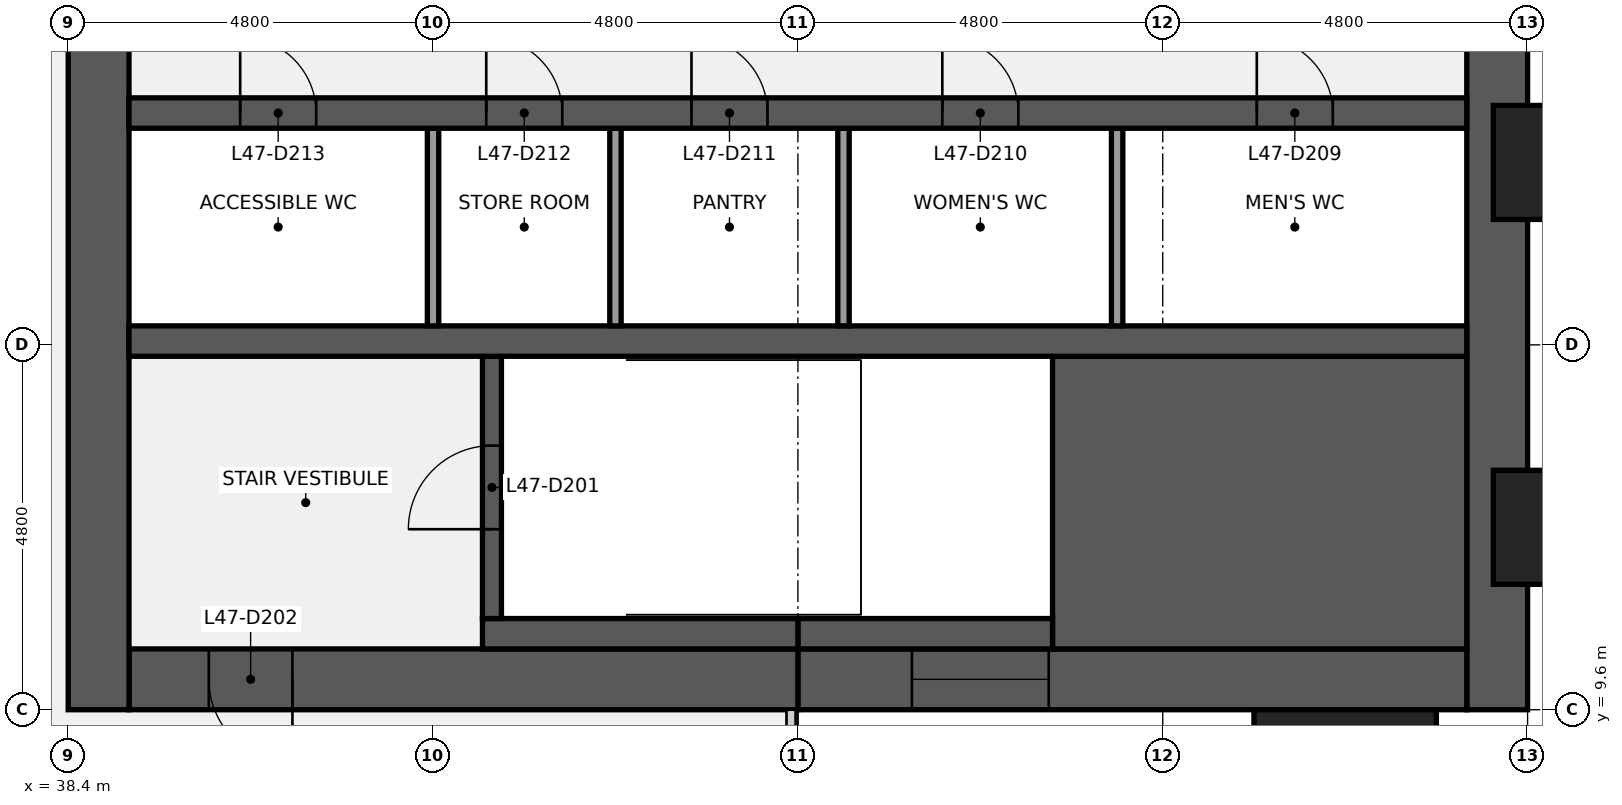
"""IFC4 building model, lengths in metres.
Left out: names, types, materials, properties, quantities, classifications, styles, units other than length and angle.
Written with IfcOpenShell. Run it as: python <this file> out.ifc"""

import sys

from ifc_helpers import new_model, si_unit, direction, frame, frame_2d, origin, origin_2d, place, context, subcontext, project, spatial, rectangle, extrude, element, fill, save


model = new_model("IFC4")
c1 = context("Model", 3, precision=1e-05, world=origin(), true_north=direction((0.0, 1.0)))
c2 = subcontext(c1, "Body", "Model", "MODEL_VIEW")
j1 = project(units=[si_unit("LENGTHUNIT", "METRE"), si_unit("PLANEANGLEUNIT", "RADIAN")], contexts=[c1])
p1 = place(None, origin())
s1 = spatial("IfcSite", under=j1, at=p1, CompositionType="ELEMENT")
p2 = place(p1, origin())
s2 = spatial("IfcBuilding", under=s1, at=p2, CompositionType="ELEMENT")
p3 = place(p2, frame((0.0, 0.0, 217.2)))
s3 = spatial("IfcBuildingStorey", under=s2, at=p3, CompositionType="ELEMENT", Elevation=217.2)
p4 = place(p3, frame((57.2, 38.4, 0.0), z_axis=(0.0, 0.0, 1.0), x_axis=(0.0, -1.0, 0.0)))
e1 = element("IfcWall", 1, at=p4, inside=s3, PredefinedType="SHEAR", context=c2, shape_type="SweptSolid", body=[
    extrude(rectangle(XDim=28.8, YDim=0.8, at=frame_2d((14.4, 0.0))), origin(), (0.0, 0.0, 1.0), 3.84),
])
p5 = place(p4, frame((18.45, 0.0, 0.9)))
e2 = element("IfcOpeningElement", 2, at=p5, cuts=e1, PredefinedType="OPENING", context=c2, shape_type="SweptSolid", body=[
    extrude(rectangle(XDim=1.5, YDim=1.5, at=frame_2d((0.75, 0.75))), frame((0.0, 0.41, 0.0), z_axis=(0.0, -1.0, 0.0), x_axis=(1.0, 0.0, 0.0)), (0.0, 0.0, 1.0), 0.82),
])
p6 = place(p4, frame((8.85, 0.0, 0.9)))
e3 = element("IfcOpeningElement", 3, at=p6, cuts=e1, PredefinedType="OPENING", context=c2, shape_type="SweptSolid", body=[
    extrude(rectangle(XDim=1.5, YDim=1.5, at=frame_2d((0.75, 0.75))), frame((0.0, 0.41, 0.0), z_axis=(0.0, -1.0, 0.0), x_axis=(1.0, 0.0, 0.0)), (0.0, 0.0, 1.0), 0.82),
])
p7 = place(p3, frame((56.8, 10.0, 0.0), z_axis=(0.0, 0.0, 1.0), x_axis=(-1.0, 0.0, 0.0)))
e4 = element("IfcWall", 4, at=p7, inside=s3, PredefinedType="SHEAR", context=c2, shape_type="SweptSolid", body=[
    extrude(rectangle(XDim=8.8, YDim=0.8, at=frame_2d((4.4, 0.0))), origin(), (0.0, 0.0, 1.0), 3.84),
])
p8 = place(p7, frame((5.5, 0.0, 0.9)))
e5 = element("IfcOpeningElement", 5, at=p8, cuts=e4, PredefinedType="OPENING", context=c2, shape_type="SweptSolid", body=[
    extrude(rectangle(XDim=1.8, YDim=1.5, at=frame_2d((0.9, 0.75))), frame((0.0, 0.41, 0.0), z_axis=(0.0, -1.0, 0.0), x_axis=(1.0, 0.0, 0.0)), (0.0, 0.0, 1.0), 0.82),
])
p9 = place(p3, frame((48.0, 10.0, 0.0), z_axis=(0.0, 0.0, 1.0), x_axis=(-1.0, 0.0, 0.0)))
e6 = element("IfcWall", 6, at=p9, inside=s3, PredefinedType="SHEAR", context=c2, shape_type="SweptSolid", body=[
    extrude(rectangle(XDim=8.8, YDim=0.8, at=frame_2d((4.4, 0.0))), origin(), (0.0, 0.0, 1.0), 3.84),
])
p10 = place(p9, frame((6.65, 0.0, 0.0)))
e7 = element("IfcOpeningElement", 7, at=p10, cuts=e6, PredefinedType="OPENING", context=c2, shape_type="SweptSolid", body=[
    extrude(rectangle(XDim=1.1, YDim=2.1, at=frame_2d((0.55, 1.05))), frame((0.0, 0.41, 0.0), z_axis=(0.0, -1.0, 0.0), x_axis=(1.0, 0.0, 0.0)), (0.0, 0.0, 1.0), 0.82),
])
p11 = place(p3, frame((38.8, 9.6, 0.0), z_axis=(0.0, 0.0, 1.0), x_axis=(0.0, 1.0, 0.0)))
e8 = element("IfcWall", 8, at=p11, inside=s3, PredefinedType="SHEAR", context=c2, shape_type="SweptSolid", body=[
    extrude(rectangle(XDim=28.8, YDim=0.8, at=frame_2d((14.4, 0.0))), origin(), (0.0, 0.0, 1.0), 3.84),
])
p12 = place(p11, frame((8.7, 0.0, 0.0)))
e9 = element("IfcOpeningElement", 9, at=p12, cuts=e8, PredefinedType="OPENING", context=c2, shape_type="SweptSolid", body=[
    extrude(rectangle(XDim=1.8, YDim=2.1, at=frame_2d((0.9, 1.05))), frame((0.0, 0.41, 0.0), z_axis=(0.0, -1.0, 0.0), x_axis=(1.0, 0.0, 0.0)), (0.0, 0.0, 1.0), 0.82),
])
p13 = place(p11, frame((18.3, 0.0, 0.0)))
e10 = element("IfcOpeningElement", 10, at=p13, cuts=e8, PredefinedType="OPENING", context=c2, shape_type="SweptSolid", body=[
    extrude(rectangle(XDim=1.8, YDim=2.1, at=frame_2d((0.9, 1.05))), frame((0.0, 0.41, 0.0), z_axis=(0.0, -1.0, 0.0), x_axis=(1.0, 0.0, 0.0)), (0.0, 0.0, 1.0), 0.82),
])
p14 = place(p3, frame((51.35, 12.325, 0.0), z_axis=(0.0, 0.0, 1.0), x_axis=(1.0, 0.0, 0.0)))
e11 = element("IfcWall", 11, at=p14, inside=s3, PredefinedType="SHEAR", context=c2, shape_type="SweptSolid", body=[
    extrude(rectangle(XDim=5.45, YDim=3.85, at=frame_2d((2.725, 0.0))), origin(), (0.0, 0.0, 1.0), 3.84),
])
p15 = place(p3, frame((48.0, 10.6, 0.0), z_axis=(0.0, 0.0, 1.0), x_axis=(1.0, 0.0, 0.0)))
e12 = element("IfcWall", 12, at=p15, inside=s3, PredefinedType="SHEAR", context=c2, shape_type="SweptSolid", body=[
    extrude(rectangle(XDim=3.35, YDim=0.4, at=frame_2d((1.675, 0.0))), origin(), (0.0, 0.0, 1.0), 3.84),
])
p16 = place(p3, frame((43.85, 10.6, 0.0), z_axis=(0.0, 0.0, 1.0), x_axis=(1.0, 0.0, 0.0)))
e13 = element("IfcWall", 13, at=p16, inside=s3, PredefinedType="SHEAR", context=c2, shape_type="SweptSolid", body=[
    extrude(rectangle(XDim=4.15, YDim=0.4, at=frame_2d((2.075, 0.0))), origin(), (0.0, 0.0, 1.0), 3.84),
])
p17 = place(p3, frame((43.975, 10.8, 0.0), z_axis=(0.0, 0.0, 1.0), x_axis=(0.0, 1.0, 0.0)))
e14 = element("IfcWall", 14, at=p17, inside=s3, PredefinedType="SHEAR", context=c2, shape_type="SweptSolid", body=[
    extrude(rectangle(XDim=3.45, YDim=0.25, at=frame_2d((1.725, 0.0))), origin(), (0.0, 0.0, 1.0), 3.84),
])
p18 = place(p17, frame((1.175, 0.0, 0.0)))
e15 = element("IfcOpeningElement", 15, at=p18, cuts=e14, PredefinedType="OPENING", context=c2, shape_type="SweptSolid", body=[
    extrude(rectangle(XDim=1.1, YDim=2.1, at=frame_2d((0.55, 1.05))), frame((0.0, 0.135, 0.0), z_axis=(0.0, -1.0, 0.0), x_axis=(1.0, 0.0, 0.0)), (0.0, 0.0, 1.0), 0.27),
])
p19 = place(p3, frame((39.2, 14.45, 0.0), z_axis=(0.0, 0.0, 1.0), x_axis=(1.0, 0.0, 0.0)))
e16 = element("IfcWall", 16, at=p19, inside=s3, PredefinedType="SHEAR", context=c2, shape_type="SweptSolid", body=[
    extrude(rectangle(XDim=17.6, YDim=0.4, at=frame_2d((8.8, 0.0))), origin(), (0.0, 0.0, 1.0), 3.84),
])
for number, where, z_axis, x_axis in (
    (17, (52.2, 14.65, 0.0), (0.0, 0.0, 1.0), (0.0, 1.0, 0.0)),
    (18, (48.6, 14.65, 0.0), (0.0, 0.0, 1.0), (0.0, 1.0, 0.0)),
    (19, (45.6, 14.65, 0.0), (0.0, 0.0, 1.0), (0.0, 1.0, 0.0)),
    (20, (43.2, 14.65, 0.0), (0.0, 0.0, 1.0), (0.0, 1.0, 0.0)),
):
    element("IfcWall", number, at=place(p3, frame(where, z_axis=z_axis, x_axis=x_axis)), inside=s3, PredefinedType="PARTITIONING", context=c2, shape_type="SweptSolid", body=[
        extrude(rectangle(XDim=2.6, YDim=0.15, at=frame_2d((1.3, 0.0))), origin(), (0.0, 0.0, 1.0), 3.84),
    ])
p20 = place(p3, frame((39.2, 17.45, 0.0), z_axis=(0.0, 0.0, 1.0), x_axis=(1.0, 0.0, 0.0)))
e21 = element("IfcWall", 21, at=p20, inside=s3, PredefinedType="SHEAR", context=c2, shape_type="SweptSolid", body=[
    extrude(rectangle(XDim=17.6, YDim=0.4, at=frame_2d((8.8, 0.0))), origin(), (0.0, 0.0, 1.0), 3.84),
])
p21 = place(p20, frame((14.837, 0.0, 0.0)))
e22 = element("IfcOpeningElement", 22, at=p21, cuts=e21, PredefinedType="OPENING", context=c2, shape_type="SweptSolid", body=[
    extrude(rectangle(XDim=1.0, YDim=2.1, at=frame_2d((0.5, 1.05))), frame((0.0, 0.21, 0.0), z_axis=(0.0, -1.0, 0.0), x_axis=(1.0, 0.0, 0.0)), (0.0, 0.0, 1.0), 0.42),
])
p22 = place(p20, frame((10.7, 0.0, 0.0)))
e23 = element("IfcOpeningElement", 23, at=p22, cuts=e21, PredefinedType="OPENING", context=c2, shape_type="SweptSolid", body=[
    extrude(rectangle(XDim=1.0, YDim=2.1, at=frame_2d((0.5, 1.05))), frame((0.0, 0.21, 0.0), z_axis=(0.0, -1.0, 0.0), x_axis=(1.0, 0.0, 0.0)), (0.0, 0.0, 1.0), 0.42),
])
p23 = place(p20, frame((7.4, 0.0, 0.0)))
e24 = element("IfcOpeningElement", 24, at=p23, cuts=e21, PredefinedType="OPENING", context=c2, shape_type="SweptSolid", body=[
    extrude(rectangle(XDim=1.0, YDim=2.1, at=frame_2d((0.5, 1.05))), frame((0.0, 0.21, 0.0), z_axis=(0.0, -1.0, 0.0), x_axis=(1.0, 0.0, 0.0)), (0.0, 0.0, 1.0), 0.42),
])
p24 = place(p20, frame((4.7, 0.0, 0.0)))
e25 = element("IfcOpeningElement", 25, at=p24, cuts=e21, PredefinedType="OPENING", context=c2, shape_type="SweptSolid", body=[
    extrude(rectangle(XDim=1.0, YDim=2.1, at=frame_2d((0.5, 1.05))), frame((0.0, 0.21, 0.0), z_axis=(0.0, -1.0, 0.0), x_axis=(1.0, 0.0, 0.0)), (0.0, 0.0, 1.0), 0.42),
])
p25 = place(p20, frame((1.462, 0.0, 0.0)))
e26 = element("IfcOpeningElement", 26, at=p25, cuts=e21, PredefinedType="OPENING", context=c2, shape_type="SweptSolid", body=[
    extrude(rectangle(XDim=1.0, YDim=2.1, at=frame_2d((0.5, 1.05))), frame((0.0, 0.21, 0.0), z_axis=(0.0, -1.0, 0.0), x_axis=(1.0, 0.0, 0.0)), (0.0, 0.0, 1.0), 0.42),
])
for number, where, z_axis, x_axis in (
    (27, (55.2, 8.85, 0.0), (0.0, 0.0, 1.0), (1.0, 0.0, 0.0)),
    (28, (58.35, 12.0, 0.0), (0.0, 0.0, 1.0), (0.0, 1.0, 0.0)),
    (29, (58.35, 16.8, 0.0), (0.0, 0.0, 1.0), (0.0, 1.0, 0.0)),
):
    element("IfcColumn", number, at=place(p3, frame(where, z_axis=z_axis, x_axis=x_axis)), inside=s3, PredefinedType="PILASTER", context=c2, shape_type="SweptSolid", body=[
        extrude(rectangle(XDim=2.4, YDim=1.5, at=origin_2d()), origin(), (0.0, 0.0, 1.0), 4.0),
    ])
p26 = place(p18, origin())
e30 = element("IfcDoor", 30, at=p26, inside=s3, OperationType="SINGLE_SWING_LEFT", PredefinedType="DOOR", context=c2, shape_type="SweptSolid", body=[
    extrude(rectangle(XDim=1.1, YDim=2.1, at=frame_2d((0.55, 1.05))), frame((0.0, 0.025, 0.0), z_axis=(0.0, -1.0, 0.0), x_axis=(1.0, 0.0, 0.0)), (0.0, 0.0, 1.0), 0.05),
])
fill(e15, e30)
p27 = place(p10, origin())
e31 = element("IfcDoor", 31, at=p27, inside=s3, OperationType="SINGLE_SWING_LEFT", PredefinedType="DOOR", context=c2, shape_type="SweptSolid", body=[
    extrude(rectangle(XDim=1.1, YDim=2.1, at=frame_2d((0.55, 1.05))), frame((0.0, 0.025, 0.0), z_axis=(0.0, -1.0, 0.0), x_axis=(1.0, 0.0, 0.0)), (0.0, 0.0, 1.0), 0.05),
])
fill(e7, e31)
p28 = place(p21, origin())
e32 = element("IfcDoor", 32, at=p28, inside=s3, OperationType="SINGLE_SWING_LEFT", PredefinedType="DOOR", context=c2, shape_type="SweptSolid", body=[
    extrude(rectangle(XDim=1.0, YDim=2.1, at=frame_2d((0.5, 1.05))), frame((0.0, 0.025, 0.0), z_axis=(0.0, -1.0, 0.0), x_axis=(1.0, 0.0, 0.0)), (0.0, 0.0, 1.0), 0.05),
])
fill(e22, e32)
p29 = place(p22, origin())
e33 = element("IfcDoor", 33, at=p29, inside=s3, OperationType="SINGLE_SWING_LEFT", PredefinedType="DOOR", context=c2, shape_type="SweptSolid", body=[
    extrude(rectangle(XDim=1.0, YDim=2.1, at=frame_2d((0.5, 1.05))), frame((0.0, 0.025, 0.0), z_axis=(0.0, -1.0, 0.0), x_axis=(1.0, 0.0, 0.0)), (0.0, 0.0, 1.0), 0.05),
])
fill(e23, e33)
p30 = place(p23, origin())
e34 = element("IfcDoor", 34, at=p30, inside=s3, OperationType="SINGLE_SWING_LEFT", PredefinedType="DOOR", context=c2, shape_type="SweptSolid", body=[
    extrude(rectangle(XDim=1.0, YDim=2.1, at=frame_2d((0.5, 1.05))), frame((0.0, 0.025, 0.0), z_axis=(0.0, -1.0, 0.0), x_axis=(1.0, 0.0, 0.0)), (0.0, 0.0, 1.0), 0.05),
])
fill(e24, e34)
p31 = place(p24, origin())
e35 = element("IfcDoor", 35, at=p31, inside=s3, OperationType="SINGLE_SWING_LEFT", PredefinedType="DOOR", context=c2, shape_type="SweptSolid", body=[
    extrude(rectangle(XDim=1.0, YDim=2.1, at=frame_2d((0.5, 1.05))), frame((0.0, 0.025, 0.0), z_axis=(0.0, -1.0, 0.0), x_axis=(1.0, 0.0, 0.0)), (0.0, 0.0, 1.0), 0.05),
])
fill(e25, e35)
p32 = place(p25, origin())
e36 = element("IfcDoor", 36, at=p32, inside=s3, OperationType="SINGLE_SWING_LEFT", PredefinedType="DOOR", context=c2, shape_type="SweptSolid", body=[
    extrude(rectangle(XDim=1.0, YDim=2.1, at=frame_2d((0.5, 1.05))), frame((0.0, 0.025, 0.0), z_axis=(0.0, -1.0, 0.0), x_axis=(1.0, 0.0, 0.0)), (0.0, 0.0, 1.0), 0.05),
])
fill(e26, e36)
p33 = place(p8, origin())
e37 = element("IfcWindow", 37, at=p33, inside=s3, PartitioningType="SINGLE_PANEL", PredefinedType="WINDOW", context=c2, shape_type="SweptSolid", body=[
    extrude(rectangle(XDim=1.8, YDim=1.5, at=frame_2d((0.9, 0.75))), frame((0.0, 0.03, 0.0), z_axis=(0.0, -1.0, 0.0), x_axis=(1.0, 0.0, 0.0)), (0.0, 0.0, 1.0), 0.06),
])
fill(e5, e37)
save(model, sys.argv[1])
